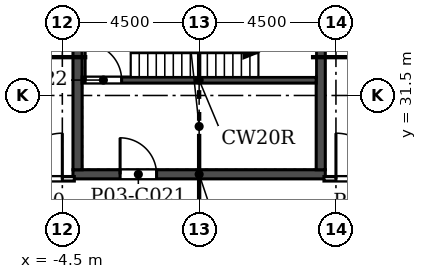
"""IFC4 building model, lengths in metres.
Left out: names, types, materials, properties, quantities, classifications, styles, units other than length and angle.
Written with IfcOpenShell. Run it as: python <this file> out.ifc"""

import sys

from ifc_helpers import new_model, si_unit, direction, frame, frame_2d, origin, place, context, subcontext, project, spatial, rectangle, extrude, element, fill, save


model = new_model("IFC4")
c1 = context("Model", 3, precision=1e-05, world=origin(), true_north=direction((0.0, 1.0)))
c2 = subcontext(c1, "Body", "Model", "MODEL_VIEW")
j1 = project(units=[si_unit("LENGTHUNIT", "METRE"), si_unit("PLANEANGLEUNIT", "RADIAN")], contexts=[c1])
p1 = place(None, origin())
s1 = spatial("IfcSite", under=j1, at=p1, CompositionType="ELEMENT")
p2 = place(p1, origin())
s2 = spatial("IfcBuilding", under=s1, at=p2, CompositionType="ELEMENT")
p3 = place(p2, frame((0.0, 0.0, 20.0)))
s3 = spatial("IfcBuildingStorey", under=s2, at=p3, CompositionType="ELEMENT", Elevation=20.0)
p4 = place(p3, frame((42.853, 8.575, 0.0), z_axis=(0.0, 0.0, 1.0), x_axis=(-0.49999894854, 0.866026010844, 0.0)))
e1 = element("IfcWall", 1, at=p4, inside=s3, PredefinedType="SOLIDWALL", context=c2, shape_type="SweptSolid", body=[
    extrude(rectangle(XDim=76.0, YDim=0.34, at=frame_2d((38.0, 0.0))), origin(), (0.0, 0.0, 1.0), 3.0),
])
p5 = place(p4, frame((1.058, 0.0, 0.9)))
e2 = element("IfcOpeningElement", 2, at=p5, cuts=e1, PredefinedType="OPENING", context=c2, shape_type="SweptSolid", body=[
    extrude(rectangle(XDim=1.885, YDim=1.9, at=frame_2d((0.942, 0.95))), frame((0.0, 0.18, 0.0), z_axis=(0.0, -1.0, 0.0), x_axis=(1.0, 0.0, 0.0)), (0.0, 0.0, 1.0), 0.36),
])
p6 = place(p4, frame((4.058, 0.0, 0.9)))
e3 = element("IfcOpeningElement", 3, at=p6, cuts=e1, PredefinedType="OPENING", context=c2, shape_type="SweptSolid", body=[
    extrude(rectangle(XDim=1.885, YDim=1.9, at=frame_2d((0.942, 0.95))), frame((0.0, 0.18, 0.0), z_axis=(0.0, -1.0, 0.0), x_axis=(1.0, 0.0, 0.0)), (0.0, 0.0, 1.0), 0.36),
])
p7 = place(p4, frame((7.058, 0.0, 0.9)))
e4 = element("IfcOpeningElement", 4, at=p7, cuts=e1, PredefinedType="OPENING", context=c2, shape_type="SweptSolid", body=[
    extrude(rectangle(XDim=1.885, YDim=1.9, at=frame_2d((0.942, 0.95))), frame((0.0, 0.18, 0.0), z_axis=(0.0, -1.0, 0.0), x_axis=(1.0, 0.0, 0.0)), (0.0, 0.0, 1.0), 0.36),
])
p8 = place(p4, frame((10.058, 0.0, 0.9)))
e5 = element("IfcOpeningElement", 5, at=p8, cuts=e1, PredefinedType="OPENING", context=c2, shape_type="SweptSolid", body=[
    extrude(rectangle(XDim=1.885, YDim=1.9, at=frame_2d((0.942, 0.95))), frame((0.0, 0.18, 0.0), z_axis=(0.0, -1.0, 0.0), x_axis=(1.0, 0.0, 0.0)), (0.0, 0.0, 1.0), 0.36),
])
p9 = place(p4, frame((13.058, 0.0, 0.9)))
e6 = element("IfcOpeningElement", 6, at=p9, cuts=e1, PredefinedType="OPENING", context=c2, shape_type="SweptSolid", body=[
    extrude(rectangle(XDim=1.885, YDim=1.9, at=frame_2d((0.942, 0.95))), frame((0.0, 0.18, 0.0), z_axis=(0.0, -1.0, 0.0), x_axis=(1.0, 0.0, 0.0)), (0.0, 0.0, 1.0), 0.36),
])
p10 = place(p4, frame((16.058, 0.0, 0.9)))
e7 = element("IfcOpeningElement", 7, at=p10, cuts=e1, PredefinedType="OPENING", context=c2, shape_type="SweptSolid", body=[
    extrude(rectangle(XDim=1.885, YDim=1.9, at=frame_2d((0.942, 0.95))), frame((0.0, 0.18, 0.0), z_axis=(0.0, -1.0, 0.0), x_axis=(1.0, 0.0, 0.0)), (0.0, 0.0, 1.0), 0.36),
])
p11 = place(p4, frame((19.058, 0.0, 0.9)))
e8 = element("IfcOpeningElement", 8, at=p11, cuts=e1, PredefinedType="OPENING", context=c2, shape_type="SweptSolid", body=[
    extrude(rectangle(XDim=1.885, YDim=1.9, at=frame_2d((0.942, 0.95))), frame((0.0, 0.18, 0.0), z_axis=(0.0, -1.0, 0.0), x_axis=(1.0, 0.0, 0.0)), (0.0, 0.0, 1.0), 0.36),
])
p12 = place(p4, frame((22.058, 0.0, 0.9)))
e9 = element("IfcOpeningElement", 9, at=p12, cuts=e1, PredefinedType="OPENING", context=c2, shape_type="SweptSolid", body=[
    extrude(rectangle(XDim=1.885, YDim=1.9, at=frame_2d((0.942, 0.95))), frame((0.0, 0.18, 0.0), z_axis=(0.0, -1.0, 0.0), x_axis=(1.0, 0.0, 0.0)), (0.0, 0.0, 1.0), 0.36),
])
p13 = place(p4, frame((25.058, 0.0, 0.9)))
e10 = element("IfcOpeningElement", 10, at=p13, cuts=e1, PredefinedType="OPENING", context=c2, shape_type="SweptSolid", body=[
    extrude(rectangle(XDim=1.885, YDim=1.9, at=frame_2d((0.942, 0.95))), frame((0.0, 0.18, 0.0), z_axis=(0.0, -1.0, 0.0), x_axis=(1.0, 0.0, 0.0)), (0.0, 0.0, 1.0), 0.36),
])
p14 = place(p4, frame((28.058, 0.0, 0.9)))
e11 = element("IfcOpeningElement", 11, at=p14, cuts=e1, PredefinedType="OPENING", context=c2, shape_type="SweptSolid", body=[
    extrude(rectangle(XDim=1.885, YDim=1.9, at=frame_2d((0.942, 0.95))), frame((0.0, 0.18, 0.0), z_axis=(0.0, -1.0, 0.0), x_axis=(1.0, 0.0, 0.0)), (0.0, 0.0, 1.0), 0.36),
])
p15 = place(p4, frame((31.058, 0.0, 0.9)))
e12 = element("IfcOpeningElement", 12, at=p15, cuts=e1, PredefinedType="OPENING", context=c2, shape_type="SweptSolid", body=[
    extrude(rectangle(XDim=1.885, YDim=1.9, at=frame_2d((0.942, 0.95))), frame((0.0, 0.18, 0.0), z_axis=(0.0, -1.0, 0.0), x_axis=(1.0, 0.0, 0.0)), (0.0, 0.0, 1.0), 0.36),
])
p16 = place(p4, frame((34.058, 0.0, 0.9)))
e13 = element("IfcOpeningElement", 13, at=p16, cuts=e1, PredefinedType="OPENING", context=c2, shape_type="SweptSolid", body=[
    extrude(rectangle(XDim=1.885, YDim=1.9, at=frame_2d((0.942, 0.95))), frame((0.0, 0.18, 0.0), z_axis=(0.0, -1.0, 0.0), x_axis=(1.0, 0.0, 0.0)), (0.0, 0.0, 1.0), 0.36),
])
p17 = place(p4, frame((37.058, 0.0, 0.9)))
e14 = element("IfcOpeningElement", 14, at=p17, cuts=e1, PredefinedType="OPENING", context=c2, shape_type="SweptSolid", body=[
    extrude(rectangle(XDim=1.885, YDim=1.9, at=frame_2d((0.942, 0.95))), frame((0.0, 0.18, 0.0), z_axis=(0.0, -1.0, 0.0), x_axis=(1.0, 0.0, 0.0)), (0.0, 0.0, 1.0), 0.36),
])
p18 = place(p4, frame((40.058, 0.0, 0.9)))
e15 = element("IfcOpeningElement", 15, at=p18, cuts=e1, PredefinedType="OPENING", context=c2, shape_type="SweptSolid", body=[
    extrude(rectangle(XDim=1.885, YDim=1.9, at=frame_2d((0.942, 0.95))), frame((0.0, 0.18, 0.0), z_axis=(0.0, -1.0, 0.0), x_axis=(1.0, 0.0, 0.0)), (0.0, 0.0, 1.0), 0.36),
])
p19 = place(p4, frame((43.058, 0.0, 0.9)))
e16 = element("IfcOpeningElement", 16, at=p19, cuts=e1, PredefinedType="OPENING", context=c2, shape_type="SweptSolid", body=[
    extrude(rectangle(XDim=1.885, YDim=1.9, at=frame_2d((0.942, 0.95))), frame((0.0, 0.18, 0.0), z_axis=(0.0, -1.0, 0.0), x_axis=(1.0, 0.0, 0.0)), (0.0, 0.0, 1.0), 0.36),
])
p20 = place(p4, frame((46.058, 0.0, 0.9)))
e17 = element("IfcOpeningElement", 17, at=p20, cuts=e1, PredefinedType="OPENING", context=c2, shape_type="SweptSolid", body=[
    extrude(rectangle(XDim=1.885, YDim=1.9, at=frame_2d((0.942, 0.95))), frame((0.0, 0.18, 0.0), z_axis=(0.0, -1.0, 0.0), x_axis=(1.0, 0.0, 0.0)), (0.0, 0.0, 1.0), 0.36),
])
p21 = place(p4, frame((49.058, 0.0, 0.9)))
e18 = element("IfcOpeningElement", 18, at=p21, cuts=e1, PredefinedType="OPENING", context=c2, shape_type="SweptSolid", body=[
    extrude(rectangle(XDim=1.885, YDim=1.9, at=frame_2d((0.942, 0.95))), frame((0.0, 0.18, 0.0), z_axis=(0.0, -1.0, 0.0), x_axis=(1.0, 0.0, 0.0)), (0.0, 0.0, 1.0), 0.36),
])
p22 = place(p4, frame((52.058, 0.0, 0.9)))
e19 = element("IfcOpeningElement", 19, at=p22, cuts=e1, PredefinedType="OPENING", context=c2, shape_type="SweptSolid", body=[
    extrude(rectangle(XDim=1.885, YDim=1.9, at=frame_2d((0.942, 0.95))), frame((0.0, 0.18, 0.0), z_axis=(0.0, -1.0, 0.0), x_axis=(1.0, 0.0, 0.0)), (0.0, 0.0, 1.0), 0.36),
])
p23 = place(p4, frame((55.058, 0.0, 0.9)))
e20 = element("IfcOpeningElement", 20, at=p23, cuts=e1, PredefinedType="OPENING", context=c2, shape_type="SweptSolid", body=[
    extrude(rectangle(XDim=1.885, YDim=1.9, at=frame_2d((0.942, 0.95))), frame((0.0, 0.18, 0.0), z_axis=(0.0, -1.0, 0.0), x_axis=(1.0, 0.0, 0.0)), (0.0, 0.0, 1.0), 0.36),
])
p24 = place(p4, frame((58.058, 0.0, 0.9)))
e21 = element("IfcOpeningElement", 21, at=p24, cuts=e1, PredefinedType="OPENING", context=c2, shape_type="SweptSolid", body=[
    extrude(rectangle(XDim=1.885, YDim=1.9, at=frame_2d((0.942, 0.95))), frame((0.0, 0.18, 0.0), z_axis=(0.0, -1.0, 0.0), x_axis=(1.0, 0.0, 0.0)), (0.0, 0.0, 1.0), 0.36),
])
p25 = place(p4, frame((61.058, 0.0, 0.9)))
e22 = element("IfcOpeningElement", 22, at=p25, cuts=e1, PredefinedType="OPENING", context=c2, shape_type="SweptSolid", body=[
    extrude(rectangle(XDim=1.885, YDim=1.9, at=frame_2d((0.942, 0.95))), frame((0.0, 0.18, 0.0), z_axis=(0.0, -1.0, 0.0), x_axis=(1.0, 0.0, 0.0)), (0.0, 0.0, 1.0), 0.36),
])
p26 = place(p4, frame((64.058, 0.0, 0.9)))
e23 = element("IfcOpeningElement", 23, at=p26, cuts=e1, PredefinedType="OPENING", context=c2, shape_type="SweptSolid", body=[
    extrude(rectangle(XDim=1.885, YDim=1.9, at=frame_2d((0.942, 0.95))), frame((0.0, 0.18, 0.0), z_axis=(0.0, -1.0, 0.0), x_axis=(1.0, 0.0, 0.0)), (0.0, 0.0, 1.0), 0.36),
])
p27 = place(p4, frame((67.058, 0.0, 0.9)))
e24 = element("IfcOpeningElement", 24, at=p27, cuts=e1, PredefinedType="OPENING", context=c2, shape_type="SweptSolid", body=[
    extrude(rectangle(XDim=1.885, YDim=1.9, at=frame_2d((0.942, 0.95))), frame((0.0, 0.18, 0.0), z_axis=(0.0, -1.0, 0.0), x_axis=(1.0, 0.0, 0.0)), (0.0, 0.0, 1.0), 0.36),
])
p28 = place(p4, frame((70.058, 0.0, 0.9)))
e25 = element("IfcOpeningElement", 25, at=p28, cuts=e1, PredefinedType="OPENING", context=c2, shape_type="SweptSolid", body=[
    extrude(rectangle(XDim=1.885, YDim=1.9, at=frame_2d((0.942, 0.95))), frame((0.0, 0.18, 0.0), z_axis=(0.0, -1.0, 0.0), x_axis=(1.0, 0.0, 0.0)), (0.0, 0.0, 1.0), 0.36),
])
p29 = place(p4, frame((73.058, 0.0, 0.9)))
e26 = element("IfcOpeningElement", 26, at=p29, cuts=e1, PredefinedType="OPENING", context=c2, shape_type="SweptSolid", body=[
    extrude(rectangle(XDim=1.885, YDim=1.9, at=frame_2d((0.942, 0.95))), frame((0.0, 0.18, 0.0), z_axis=(0.0, -1.0, 0.0), x_axis=(1.0, 0.0, 0.0)), (0.0, 0.0, 1.0), 0.36),
])
p30 = place(p3, frame((-4.853, 74.393, 0.0), z_axis=(0.0, 0.0, 1.0), x_axis=(-0.49999894854, -0.866026010844, 0.0)))
e27 = element("IfcWall", 27, at=p30, inside=s3, PredefinedType="SOLIDWALL", context=c2, shape_type="SweptSolid", body=[
    extrude(rectangle(XDim=76.0, YDim=0.34, at=frame_2d((38.0, 0.0))), origin(), (0.0, 0.0, 1.0), 3.0),
])
p31 = place(p30, frame((1.058, 0.0, 0.9)))
e28 = element("IfcOpeningElement", 28, at=p31, cuts=e27, PredefinedType="OPENING", context=c2, shape_type="SweptSolid", body=[
    extrude(rectangle(XDim=1.885, YDim=1.9, at=frame_2d((0.942, 0.95))), frame((0.0, 0.18, 0.0), z_axis=(0.0, -1.0, 0.0), x_axis=(1.0, 0.0, 0.0)), (0.0, 0.0, 1.0), 0.36),
])
p32 = place(p30, frame((4.058, 0.0, 0.9)))
e29 = element("IfcOpeningElement", 29, at=p32, cuts=e27, PredefinedType="OPENING", context=c2, shape_type="SweptSolid", body=[
    extrude(rectangle(XDim=1.885, YDim=1.9, at=frame_2d((0.942, 0.95))), frame((0.0, 0.18, 0.0), z_axis=(0.0, -1.0, 0.0), x_axis=(1.0, 0.0, 0.0)), (0.0, 0.0, 1.0), 0.36),
])
p33 = place(p30, frame((7.058, 0.0, 0.9)))
e30 = element("IfcOpeningElement", 30, at=p33, cuts=e27, PredefinedType="OPENING", context=c2, shape_type="SweptSolid", body=[
    extrude(rectangle(XDim=1.885, YDim=1.9, at=frame_2d((0.942, 0.95))), frame((0.0, 0.18, 0.0), z_axis=(0.0, -1.0, 0.0), x_axis=(1.0, 0.0, 0.0)), (0.0, 0.0, 1.0), 0.36),
])
p34 = place(p30, frame((10.058, 0.0, 0.9)))
e31 = element("IfcOpeningElement", 31, at=p34, cuts=e27, PredefinedType="OPENING", context=c2, shape_type="SweptSolid", body=[
    extrude(rectangle(XDim=1.885, YDim=1.9, at=frame_2d((0.942, 0.95))), frame((0.0, 0.18, 0.0), z_axis=(0.0, -1.0, 0.0), x_axis=(1.0, 0.0, 0.0)), (0.0, 0.0, 1.0), 0.36),
])
p35 = place(p30, frame((13.058, 0.0, 0.9)))
e32 = element("IfcOpeningElement", 32, at=p35, cuts=e27, PredefinedType="OPENING", context=c2, shape_type="SweptSolid", body=[
    extrude(rectangle(XDim=1.885, YDim=1.9, at=frame_2d((0.942, 0.95))), frame((0.0, 0.18, 0.0), z_axis=(0.0, -1.0, 0.0), x_axis=(1.0, 0.0, 0.0)), (0.0, 0.0, 1.0), 0.36),
])
p36 = place(p30, frame((16.058, 0.0, 0.9)))
e33 = element("IfcOpeningElement", 33, at=p36, cuts=e27, PredefinedType="OPENING", context=c2, shape_type="SweptSolid", body=[
    extrude(rectangle(XDim=1.885, YDim=1.9, at=frame_2d((0.942, 0.95))), frame((0.0, 0.18, 0.0), z_axis=(0.0, -1.0, 0.0), x_axis=(1.0, 0.0, 0.0)), (0.0, 0.0, 1.0), 0.36),
])
p37 = place(p30, frame((19.058, 0.0, 0.9)))
e34 = element("IfcOpeningElement", 34, at=p37, cuts=e27, PredefinedType="OPENING", context=c2, shape_type="SweptSolid", body=[
    extrude(rectangle(XDim=1.885, YDim=1.9, at=frame_2d((0.942, 0.95))), frame((0.0, 0.18, 0.0), z_axis=(0.0, -1.0, 0.0), x_axis=(1.0, 0.0, 0.0)), (0.0, 0.0, 1.0), 0.36),
])
p38 = place(p30, frame((22.058, 0.0, 0.9)))
e35 = element("IfcOpeningElement", 35, at=p38, cuts=e27, PredefinedType="OPENING", context=c2, shape_type="SweptSolid", body=[
    extrude(rectangle(XDim=1.885, YDim=1.9, at=frame_2d((0.942, 0.95))), frame((0.0, 0.18, 0.0), z_axis=(0.0, -1.0, 0.0), x_axis=(1.0, 0.0, 0.0)), (0.0, 0.0, 1.0), 0.36),
])
p39 = place(p30, frame((25.058, 0.0, 0.9)))
e36 = element("IfcOpeningElement", 36, at=p39, cuts=e27, PredefinedType="OPENING", context=c2, shape_type="SweptSolid", body=[
    extrude(rectangle(XDim=1.885, YDim=1.9, at=frame_2d((0.942, 0.95))), frame((0.0, 0.18, 0.0), z_axis=(0.0, -1.0, 0.0), x_axis=(1.0, 0.0, 0.0)), (0.0, 0.0, 1.0), 0.36),
])
p40 = place(p30, frame((28.058, 0.0, 0.9)))
e37 = element("IfcOpeningElement", 37, at=p40, cuts=e27, PredefinedType="OPENING", context=c2, shape_type="SweptSolid", body=[
    extrude(rectangle(XDim=1.885, YDim=1.9, at=frame_2d((0.942, 0.95))), frame((0.0, 0.18, 0.0), z_axis=(0.0, -1.0, 0.0), x_axis=(1.0, 0.0, 0.0)), (0.0, 0.0, 1.0), 0.36),
])
p41 = place(p30, frame((31.058, 0.0, 0.9)))
e38 = element("IfcOpeningElement", 38, at=p41, cuts=e27, PredefinedType="OPENING", context=c2, shape_type="SweptSolid", body=[
    extrude(rectangle(XDim=1.885, YDim=1.9, at=frame_2d((0.942, 0.95))), frame((0.0, 0.18, 0.0), z_axis=(0.0, -1.0, 0.0), x_axis=(1.0, 0.0, 0.0)), (0.0, 0.0, 1.0), 0.36),
])
p42 = place(p30, frame((34.058, 0.0, 0.9)))
e39 = element("IfcOpeningElement", 39, at=p42, cuts=e27, PredefinedType="OPENING", context=c2, shape_type="SweptSolid", body=[
    extrude(rectangle(XDim=1.885, YDim=1.9, at=frame_2d((0.942, 0.95))), frame((0.0, 0.18, 0.0), z_axis=(0.0, -1.0, 0.0), x_axis=(1.0, 0.0, 0.0)), (0.0, 0.0, 1.0), 0.36),
])
p43 = place(p30, frame((37.058, 0.0, 0.9)))
e40 = element("IfcOpeningElement", 40, at=p43, cuts=e27, PredefinedType="OPENING", context=c2, shape_type="SweptSolid", body=[
    extrude(rectangle(XDim=1.885, YDim=1.9, at=frame_2d((0.942, 0.95))), frame((0.0, 0.18, 0.0), z_axis=(0.0, -1.0, 0.0), x_axis=(1.0, 0.0, 0.0)), (0.0, 0.0, 1.0), 0.36),
])
p44 = place(p30, frame((40.058, 0.0, 0.9)))
e41 = element("IfcOpeningElement", 41, at=p44, cuts=e27, PredefinedType="OPENING", context=c2, shape_type="SweptSolid", body=[
    extrude(rectangle(XDim=1.885, YDim=1.9, at=frame_2d((0.942, 0.95))), frame((0.0, 0.18, 0.0), z_axis=(0.0, -1.0, 0.0), x_axis=(1.0, 0.0, 0.0)), (0.0, 0.0, 1.0), 0.36),
])
p45 = place(p30, frame((43.058, 0.0, 0.9)))
e42 = element("IfcOpeningElement", 42, at=p45, cuts=e27, PredefinedType="OPENING", context=c2, shape_type="SweptSolid", body=[
    extrude(rectangle(XDim=1.885, YDim=1.9, at=frame_2d((0.942, 0.95))), frame((0.0, 0.18, 0.0), z_axis=(0.0, -1.0, 0.0), x_axis=(1.0, 0.0, 0.0)), (0.0, 0.0, 1.0), 0.36),
])
p46 = place(p30, frame((46.058, 0.0, 0.9)))
e43 = element("IfcOpeningElement", 43, at=p46, cuts=e27, PredefinedType="OPENING", context=c2, shape_type="SweptSolid", body=[
    extrude(rectangle(XDim=1.885, YDim=1.9, at=frame_2d((0.942, 0.95))), frame((0.0, 0.18, 0.0), z_axis=(0.0, -1.0, 0.0), x_axis=(1.0, 0.0, 0.0)), (0.0, 0.0, 1.0), 0.36),
])
p47 = place(p30, frame((49.058, 0.0, 0.9)))
e44 = element("IfcOpeningElement", 44, at=p47, cuts=e27, PredefinedType="OPENING", context=c2, shape_type="SweptSolid", body=[
    extrude(rectangle(XDim=1.885, YDim=1.9, at=frame_2d((0.942, 0.95))), frame((0.0, 0.18, 0.0), z_axis=(0.0, -1.0, 0.0), x_axis=(1.0, 0.0, 0.0)), (0.0, 0.0, 1.0), 0.36),
])
p48 = place(p30, frame((52.058, 0.0, 0.9)))
e45 = element("IfcOpeningElement", 45, at=p48, cuts=e27, PredefinedType="OPENING", context=c2, shape_type="SweptSolid", body=[
    extrude(rectangle(XDim=1.885, YDim=1.9, at=frame_2d((0.942, 0.95))), frame((0.0, 0.18, 0.0), z_axis=(0.0, -1.0, 0.0), x_axis=(1.0, 0.0, 0.0)), (0.0, 0.0, 1.0), 0.36),
])
p49 = place(p30, frame((55.058, 0.0, 0.9)))
e46 = element("IfcOpeningElement", 46, at=p49, cuts=e27, PredefinedType="OPENING", context=c2, shape_type="SweptSolid", body=[
    extrude(rectangle(XDim=1.885, YDim=1.9, at=frame_2d((0.942, 0.95))), frame((0.0, 0.18, 0.0), z_axis=(0.0, -1.0, 0.0), x_axis=(1.0, 0.0, 0.0)), (0.0, 0.0, 1.0), 0.36),
])
p50 = place(p30, frame((58.058, 0.0, 0.9)))
e47 = element("IfcOpeningElement", 47, at=p50, cuts=e27, PredefinedType="OPENING", context=c2, shape_type="SweptSolid", body=[
    extrude(rectangle(XDim=1.885, YDim=1.9, at=frame_2d((0.942, 0.95))), frame((0.0, 0.18, 0.0), z_axis=(0.0, -1.0, 0.0), x_axis=(1.0, 0.0, 0.0)), (0.0, 0.0, 1.0), 0.36),
])
p51 = place(p30, frame((61.058, 0.0, 0.9)))
e48 = element("IfcOpeningElement", 48, at=p51, cuts=e27, PredefinedType="OPENING", context=c2, shape_type="SweptSolid", body=[
    extrude(rectangle(XDim=1.885, YDim=1.9, at=frame_2d((0.942, 0.95))), frame((0.0, 0.18, 0.0), z_axis=(0.0, -1.0, 0.0), x_axis=(1.0, 0.0, 0.0)), (0.0, 0.0, 1.0), 0.36),
])
p52 = place(p30, frame((64.058, 0.0, 0.9)))
e49 = element("IfcOpeningElement", 49, at=p52, cuts=e27, PredefinedType="OPENING", context=c2, shape_type="SweptSolid", body=[
    extrude(rectangle(XDim=1.885, YDim=1.9, at=frame_2d((0.942, 0.95))), frame((0.0, 0.18, 0.0), z_axis=(0.0, -1.0, 0.0), x_axis=(1.0, 0.0, 0.0)), (0.0, 0.0, 1.0), 0.36),
])
p53 = place(p30, frame((67.058, 0.0, 0.9)))
e50 = element("IfcOpeningElement", 50, at=p53, cuts=e27, PredefinedType="OPENING", context=c2, shape_type="SweptSolid", body=[
    extrude(rectangle(XDim=1.885, YDim=1.9, at=frame_2d((0.942, 0.95))), frame((0.0, 0.18, 0.0), z_axis=(0.0, -1.0, 0.0), x_axis=(1.0, 0.0, 0.0)), (0.0, 0.0, 1.0), 0.36),
])
p54 = place(p30, frame((70.058, 0.0, 0.9)))
e51 = element("IfcOpeningElement", 51, at=p54, cuts=e27, PredefinedType="OPENING", context=c2, shape_type="SweptSolid", body=[
    extrude(rectangle(XDim=1.885, YDim=1.9, at=frame_2d((0.942, 0.95))), frame((0.0, 0.18, 0.0), z_axis=(0.0, -1.0, 0.0), x_axis=(1.0, 0.0, 0.0)), (0.0, 0.0, 1.0), 0.36),
])
p55 = place(p30, frame((73.058, 0.0, 0.9)))
e52 = element("IfcOpeningElement", 52, at=p55, cuts=e27, PredefinedType="OPENING", context=c2, shape_type="SweptSolid", body=[
    extrude(rectangle(XDim=1.885, YDim=1.9, at=frame_2d((0.942, 0.95))), frame((0.0, 0.18, 0.0), z_axis=(0.0, -1.0, 0.0), x_axis=(1.0, 0.0, 0.0)), (0.0, 0.0, 1.0), 0.36),
])
p56 = place(p3, frame((-4.15, 28.907, -0.3), z_axis=(0.0, 0.0, 1.0), x_axis=(1.0, 0.0, 0.0)))
e53 = element("IfcWall", 53, at=p56, inside=s3, PredefinedType="SOLIDWALL", context=c2, shape_type="SweptSolid", body=[
    extrude(rectangle(XDim=8.3, YDim=0.3, at=frame_2d((4.15, 0.0))), origin(), (0.0, 0.0, 1.0), 3.3),
])
p57 = place(p56, frame((1.55, 0.0, 0.3)))
e54 = element("IfcOpeningElement", 54, at=p57, cuts=e53, PredefinedType="OPENING", context=c2, shape_type="SweptSolid", body=[
    extrude(rectangle(XDim=1.2, YDim=2.1, at=frame_2d((0.6, 1.05))), frame((0.0, 0.16, 0.0), z_axis=(0.0, -1.0, 0.0), x_axis=(1.0, 0.0, 0.0)), (0.0, 0.0, 1.0), 0.32),
])
for number, where, z_axis, x_axis in (
    (55, (-4.0, 29.057, -0.3), (0.0, 0.0, 1.0), (0.0, 1.0, 0.0)),
    (56, (4.0, 29.057, -0.3), (0.0, 0.0, 1.0), (0.0, 1.0, 0.0)),
):
    element("IfcWall", number, at=place(p3, frame(where, z_axis=z_axis, x_axis=x_axis)), inside=s3, PredefinedType="SOLIDWALL", context=c2, shape_type="SweptSolid", body=[
        extrude(rectangle(XDim=6.5, YDim=0.3, at=frame_2d((3.25, 0.0))), origin(), (0.0, 0.0, 1.0), 3.3),
    ])
p58 = place(p3, frame((-3.85, 32.007, -0.3), z_axis=(0.0, 0.0, 1.0), x_axis=(1.0, 0.0, 0.0)))
e57 = element("IfcWall", 57, at=p58, inside=s3, PredefinedType="SOLIDWALL", context=c2, shape_type="SweptSolid", body=[
    extrude(rectangle(XDim=7.7, YDim=0.2, at=frame_2d((3.85, 0.0))), origin(), (0.0, 0.0, 1.0), 3.3),
])
p59 = place(p58, frame((0.1, 0.0, 0.3)))
e58 = element("IfcOpeningElement", 58, at=p59, cuts=e57, PredefinedType="OPENING", context=c2, shape_type="SweptSolid", body=[
    extrude(rectangle(XDim=1.2, YDim=2.1, at=frame_2d((0.6, 1.05))), frame((0.0, 0.11, 0.0), z_axis=(0.0, -1.0, 0.0), x_axis=(1.0, 0.0, 0.0)), (0.0, 0.0, 1.0), 0.22),
])
p60 = place(p3, frame((-11.425, 28.76, 0.0), z_axis=(0.0, 0.0, 1.0), x_axis=(1.0, 0.0, 0.0)))
e59 = element("IfcWall", 59, at=p60, inside=s3, PredefinedType="PARTITIONING", context=c2, shape_type="SweptSolid", body=[
    extrude(rectangle(XDim=7.32, YDim=0.15, at=frame_2d((3.66, 0.0))), origin(), (0.0, 0.0, 1.0), 3.0),
])
p61 = place(p60, frame((3.925, 0.0, 0.0)))
e60 = element("IfcOpeningElement", 60, at=p61, cuts=e59, PredefinedType="OPENING", context=c2, shape_type="SweptSolid", body=[
    extrude(rectangle(XDim=3.0, YDim=2.4, at=frame_2d((1.5, 1.2))), frame((0.0, 0.085, 0.0), z_axis=(0.0, -1.0, 0.0), x_axis=(1.0, 0.0, 0.0)), (0.0, 0.0, 1.0), 0.17),
])
p62 = place(p3, frame((4.105, 28.76, 0.0), z_axis=(0.0, 0.0, 1.0), x_axis=(1.0, 0.0, 0.0)))
e61 = element("IfcWall", 61, at=p62, inside=s3, PredefinedType="PARTITIONING", context=c2, shape_type="SweptSolid", body=[
    extrude(rectangle(XDim=7.47, YDim=0.15, at=frame_2d((3.735, 0.0))), origin(), (0.0, 0.0, 1.0), 3.0),
])
p63 = place(p62, frame((0.395, 0.0, 0.0)))
e62 = element("IfcOpeningElement", 62, at=p63, cuts=e61, PredefinedType="OPENING", context=c2, shape_type="SweptSolid", body=[
    extrude(rectangle(XDim=3.0, YDim=2.4, at=frame_2d((1.5, 1.2))), frame((0.0, 0.085, 0.0), z_axis=(0.0, -1.0, 0.0), x_axis=(1.0, 0.0, 0.0)), (0.0, 0.0, 1.0), 0.17),
])
p64 = place(p57, origin())
e63 = element("IfcDoor", 63, at=p64, inside=s3, OperationType="SINGLE_SWING_LEFT", PredefinedType="DOOR", context=c2, shape_type="SweptSolid", body=[
    extrude(rectangle(XDim=1.2, YDim=2.1, at=frame_2d((0.6, 1.05))), frame((0.0, 0.025, 0.0), z_axis=(0.0, -1.0, 0.0), x_axis=(1.0, 0.0, 0.0)), (0.0, 0.0, 1.0), 0.05),
])
fill(e54, e63)
p65 = place(p59, origin())
e64 = element("IfcDoor", 64, at=p65, inside=s3, OperationType="SINGLE_SWING_LEFT", PredefinedType="DOOR", context=c2, shape_type="SweptSolid", body=[
    extrude(rectangle(XDim=1.2, YDim=2.1, at=frame_2d((0.6, 1.05))), frame((0.0, 0.025, 0.0), z_axis=(0.0, -1.0, 0.0), x_axis=(1.0, 0.0, 0.0)), (0.0, 0.0, 1.0), 0.05),
])
fill(e58, e64)
p66 = place(p61, origin())
e65 = element("IfcDoor", 65, at=p66, inside=s3, OperationType="DOUBLE_DOOR_SINGLE_SWING", PredefinedType="DOOR", context=c2, shape_type="SweptSolid", body=[
    extrude(rectangle(XDim=3.0, YDim=2.4, at=frame_2d((1.5, 1.2))), frame((0.0, 0.025, 0.0), z_axis=(0.0, -1.0, 0.0), x_axis=(1.0, 0.0, 0.0)), (0.0, 0.0, 1.0), 0.05),
])
fill(e60, e65)
p67 = place(p63, origin())
e66 = element("IfcDoor", 66, at=p67, inside=s3, OperationType="DOUBLE_DOOR_SINGLE_SWING", PredefinedType="DOOR", context=c2, shape_type="SweptSolid", body=[
    extrude(rectangle(XDim=3.0, YDim=2.4, at=frame_2d((1.5, 1.2))), frame((0.0, 0.025, 0.0), z_axis=(0.0, -1.0, 0.0), x_axis=(1.0, 0.0, 0.0)), (0.0, 0.0, 1.0), 0.05),
])
fill(e62, e66)
save(model, sys.argv[1])
